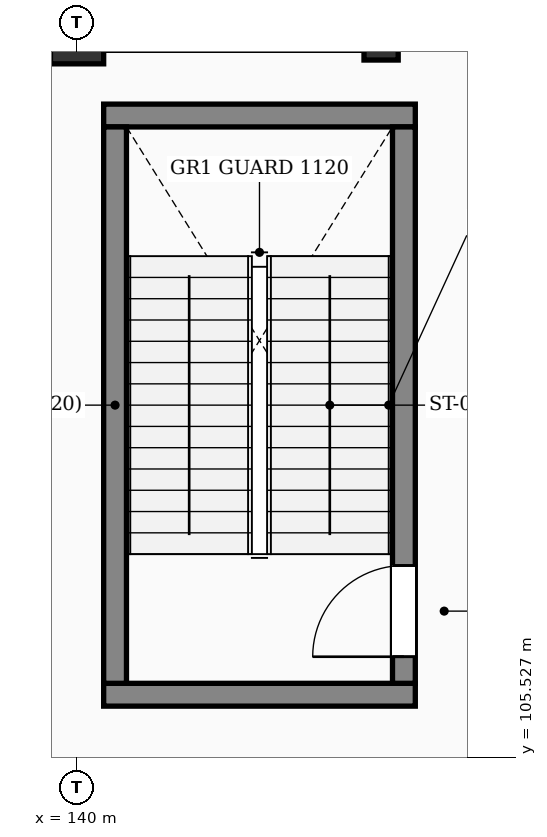
"""IFC4 building model, lengths in metres.
Left out: names, types, materials, properties, quantities, classifications, styles, units other than length and angle.
Written with IfcOpenShell. Run it as: python <this file> out.ifc"""

import sys

from ifc_helpers import new_model, si_unit, direction, frame, frame_2d, origin, origin_2d, place, context, subcontext, project, spatial, rectangle, extrude, element, fill, save


model = new_model("IFC4")
c1 = context("Model", 3, precision=1e-05, world=origin(), true_north=direction((0.0, 1.0)))
c2 = subcontext(c1, "Body", "Model", "MODEL_VIEW")
j1 = project(units=[si_unit("LENGTHUNIT", "METRE"), si_unit("PLANEANGLEUNIT", "RADIAN")], contexts=[c1])
p1 = place(None, origin())
s1 = spatial("IfcSite", under=j1, at=p1, CompositionType="ELEMENT")
p2 = place(p1, origin())
s2 = spatial("IfcBuilding", under=s1, at=p2, CompositionType="ELEMENT")
p3 = place(p2, frame((0.0, 0.0, 9.3)))
s3 = spatial("IfcBuildingStorey", under=s2, at=p3, CompositionType="ELEMENT", Elevation=9.3)
p4 = place(p3, frame((140.0, 115.0, 0.0), z_axis=(0.0, 0.0, 1.0), x_axis=(1.0, 0.0, 0.0)))
e1 = element("IfcColumn", 1, at=p4, inside=s3, PredefinedType="COLUMN", context=c2, shape_type="SweptSolid", body=[
    extrude(rectangle(XDim=0.7, YDim=0.7, at=origin_2d()), origin(), (0.0, 0.0, 1.0), 4.5),
])
p5 = place(p3, frame((144.0, 115.0, 0.0), z_axis=(0.0, 0.0, 1.0), x_axis=(1.0, 0.0, 0.0)))
e2 = element("IfcColumn", 2, at=p5, inside=s3, PredefinedType="PILASTER", context=c2, shape_type="SweptSolid", body=[
    extrude(rectangle(XDim=0.45, YDim=0.6, at=origin_2d()), origin(), (0.0, 0.0, 1.0), 4.5),
])
for number, where, z_axis, x_axis in (
    (3, (140.35, 106.35, 0.0), (0.0, 0.0, 1.0), (1.0, 0.0, 0.0)),
    (4, (144.45, 113.97, 0.0), (0.0, 0.0, 1.0), (-1.0, 0.0, 0.0)),
):
    element("IfcWall", number, at=place(p3, frame(where, z_axis=z_axis, x_axis=x_axis)), inside=s3, PredefinedType="SHEAR", context=c2, shape_type="SweptSolid", body=[
        extrude(rectangle(XDim=4.1, YDim=0.3, at=frame_2d((2.05, 0.0))), origin(), (0.0, 0.0, 1.0), 4.27),
    ])
p6 = place(p3, frame((140.5, 106.5, 0.0), z_axis=(0.0, 0.0, 1.0), x_axis=(0.0, 1.0, 0.0)))
e5 = element("IfcWall", 5, at=p6, inside=s3, PredefinedType="SHEAR", context=c2, shape_type="SweptSolid", body=[
    extrude(rectangle(XDim=7.32, YDim=0.3, at=frame_2d((3.66, 0.0))), origin(), (0.0, 0.0, 1.0), 4.27),
])
p7 = place(p3, frame((144.3, 106.5, 0.0), z_axis=(0.0, 0.0, 1.0), x_axis=(0.0, 1.0, 0.0)))
e6 = element("IfcWall", 6, at=p7, inside=s3, PredefinedType="SHEAR", context=c2, shape_type="SweptSolid", body=[
    extrude(rectangle(XDim=7.32, YDim=0.3, at=frame_2d((3.66, 0.0))), origin(), (0.0, 0.0, 1.0), 4.27),
])
p8 = place(p7, frame((0.35, 0.0, 0.0)))
e7 = element("IfcOpeningElement", 7, at=p8, cuts=e6, PredefinedType="OPENING", context=c2, shape_type="SweptSolid", body=[
    extrude(rectangle(XDim=1.2, YDim=2.15, at=frame_2d((0.6, 1.075))), frame((0.0, 0.16, 0.0), z_axis=(0.0, -1.0, 0.0), x_axis=(1.0, 0.0, 0.0)), (0.0, 0.0, 1.0), 0.32),
])
p9 = place(p8, origin())
e8 = element("IfcDoor", 8, at=p9, inside=s3, OperationType="SINGLE_SWING_LEFT", PredefinedType="DOOR", context=c2, shape_type="SweptSolid", body=[
    extrude(rectangle(XDim=1.2, YDim=2.15, at=frame_2d((0.6, 1.075))), frame((0.0, 0.025, 0.0), z_axis=(0.0, -1.0, 0.0), x_axis=(1.0, 0.0, 0.0)), (0.0, 0.0, 1.0), 0.05),
])
fill(e7, e8)
save(model, sys.argv[1])
